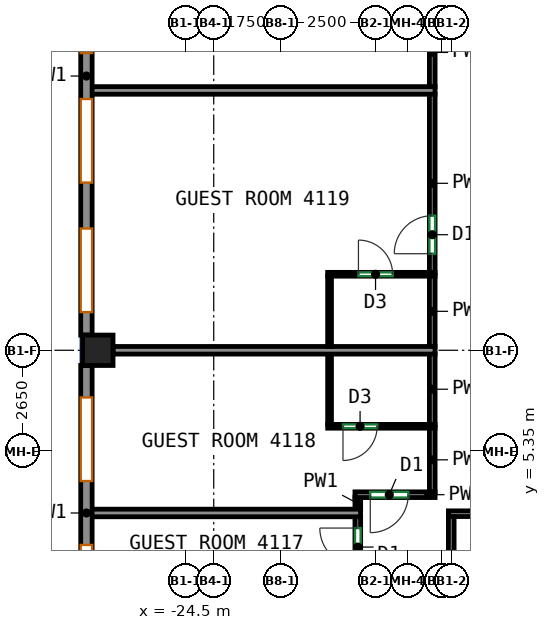
"""IFC4 building model, lengths in metres.
Left out: names, types, materials, properties, quantities, classifications, styles, units other than length and angle.
Written with IfcOpenShell. Run it as: python <this file> out.ifc"""

import sys

from ifc_helpers import new_model, si_unit, direction, frame, frame_2d, origin, origin_2d, place, context, subcontext, project, spatial, rectangle, extrude, source, transform, mapped, element, fill, save


model = new_model("IFC4")
c1 = context("Model", 3, precision=1e-05, world=origin(), true_north=direction((0.0, 1.0)))
c2 = subcontext(c1, "Body", "Model", "MODEL_VIEW")
j1 = project(units=[si_unit("LENGTHUNIT", "METRE"), si_unit("PLANEANGLEUNIT", "RADIAN")], contexts=[c1])
p1 = place(None, origin())
s1 = spatial("IfcSite", under=j1, at=p1, CompositionType="ELEMENT")
p2 = place(p1, origin())
s2 = spatial("IfcBuilding", under=s1, at=p2, CompositionType="ELEMENT")
p3 = place(p2, frame((0.0, 0.0, 175.3)))
s3 = spatial("IfcBuildingStorey", under=s2, at=p3, CompositionType="ELEMENT", Elevation=175.3)
m1 = source(origin(), c2, "Body", "SweptSolid", [
    extrude(rectangle(XDim=0.8, YDim=0.8, at=origin_2d()), origin(), (0.0, 0.0, 1.0), 3.12),
])
p4 = place(p3, frame((-26.8, 8.0, 0.0), z_axis=(0.0, 0.0, 1.0), x_axis=(1.0, 0.0, 0.0)))
e1 = element("IfcColumn", 1, at=p4, inside=s3, PredefinedType="COLUMN", context=c2, shape_type="MappedRepresentation", body=[
    mapped(m1, transform((0.0, 0.0, 0.0))),
])
m2 = source(origin(), c2, "Body", "SweptSolid", [
    extrude(rectangle(XDim=13.632, YDim=0.3, at=frame_2d((6.816, 0.0))), origin(), (0.0, 0.0, 1.0), 3.12),
])
p5 = place(p3, frame((-27.1, 22.032, 0.0), z_axis=(0.0, 0.0, 1.0), x_axis=(0.0, -1.0, 0.0)))
e2 = element("IfcWall", 2, at=p5, inside=s3, PredefinedType="SOLIDWALL", context=c2, shape_type="MappedRepresentation", body=[
    mapped(m2, transform((0.0, 0.0, 0.0))),
])
p6 = place(p5, frame((0.604, 0.0, 0.85)))
e3 = element("IfcOpeningElement", 3, at=p6, cuts=e2, PredefinedType="OPENING", context=c2, shape_type="SweptSolid", body=[
    extrude(rectangle(XDim=2.2, YDim=1.95, at=frame_2d((1.1, 0.975))), frame((0.0, 0.16, 0.0), z_axis=(0.0, -1.0, 0.0), x_axis=(1.0, 0.0, 0.0)), (0.0, 0.0, 1.0), 0.32),
])
p7 = place(p5, frame((4.012, 0.0, 0.85)))
e4 = element("IfcOpeningElement", 4, at=p7, cuts=e2, PredefinedType="OPENING", context=c2, shape_type="SweptSolid", body=[
    extrude(rectangle(XDim=2.2, YDim=1.95, at=frame_2d((1.1, 0.975))), frame((0.0, 0.16, 0.0), z_axis=(0.0, -1.0, 0.0), x_axis=(1.0, 0.0, 0.0)), (0.0, 0.0, 1.0), 0.32),
])
p8 = place(p5, frame((7.42, 0.0, 0.85)))
e5 = element("IfcOpeningElement", 5, at=p8, cuts=e2, PredefinedType="OPENING", context=c2, shape_type="SweptSolid", body=[
    extrude(rectangle(XDim=2.2, YDim=1.95, at=frame_2d((1.1, 0.975))), frame((0.0, 0.16, 0.0), z_axis=(0.0, -1.0, 0.0), x_axis=(1.0, 0.0, 0.0)), (0.0, 0.0, 1.0), 0.32),
])
p9 = place(p5, frame((10.828, 0.0, 0.85)))
e6 = element("IfcOpeningElement", 6, at=p9, cuts=e2, PredefinedType="OPENING", context=c2, shape_type="SweptSolid", body=[
    extrude(rectangle(XDim=2.2, YDim=1.95, at=frame_2d((1.1, 0.975))), frame((0.0, 0.16, 0.0), z_axis=(0.0, -1.0, 0.0), x_axis=(1.0, 0.0, 0.0)), (0.0, 0.0, 1.0), 0.32),
])
m3 = source(origin(), c2, "Body", "SweptSolid", [
    extrude(rectangle(XDim=7.763, YDim=0.3, at=frame_2d((3.881, 0.0))), origin(), (0.0, 0.0, 1.0), 3.12),
])
p10 = place(p3, frame((-27.1, 7.6, 0.0), z_axis=(0.0, 0.0, 1.0), x_axis=(0.0, -1.0, 0.0)))
e7 = element("IfcWall", 7, at=p10, inside=s3, PredefinedType="SOLIDWALL", context=c2, shape_type="MappedRepresentation", body=[
    mapped(m3, transform((0.0, 0.0, 0.0))),
])
p11 = place(p10, frame((0.841, 0.0, 0.85)))
e8 = element("IfcOpeningElement", 8, at=p11, cuts=e7, PredefinedType="OPENING", context=c2, shape_type="SweptSolid", body=[
    extrude(rectangle(XDim=2.2, YDim=1.95, at=frame_2d((1.1, 0.975))), frame((0.0, 0.16, 0.0), z_axis=(0.0, -1.0, 0.0), x_axis=(1.0, 0.0, 0.0)), (0.0, 0.0, 1.0), 0.32),
])
p12 = place(p10, frame((4.722, 0.0, 0.85)))
e9 = element("IfcOpeningElement", 9, at=p12, cuts=e7, PredefinedType="OPENING", context=c2, shape_type="SweptSolid", body=[
    extrude(rectangle(XDim=2.2, YDim=1.95, at=frame_2d((1.1, 0.975))), frame((0.0, 0.16, 0.0), z_axis=(0.0, -1.0, 0.0), x_axis=(1.0, 0.0, 0.0)), (0.0, 0.0, 1.0), 0.32),
])
p13 = place(p3, frame((-19.959, 1.478, 0.0), z_axis=(0.0, 0.0, 1.0), x_axis=(0.0, 1.0, 0.0)))
e10 = element("IfcWall", 10, at=p13, inside=s3, PredefinedType="PARTITIONING", context=c2, shape_type="SweptSolid", body=[
    extrude(rectangle(XDim=2.151, YDim=0.15, at=frame_2d((1.075, 0.0))), origin(), (0.0, 0.0, 1.0), 3.12),
])
p14 = place(p13, frame((0.844, 0.0, 0.0)))
e11 = element("IfcOpeningElement", 11, at=p14, cuts=e10, PredefinedType="OPENING", context=c2, shape_type="SweptSolid", body=[
    extrude(rectangle(XDim=1.0, YDim=2.1, at=frame_2d((0.5, 1.05))), frame((0.0, 0.085, 0.0), z_axis=(0.0, -1.0, 0.0), x_axis=(1.0, 0.0, 0.0)), (0.0, 0.0, 1.0), 0.17),
])
p15 = place(p3, frame((-19.959, 3.809, 0.0), z_axis=(0.0, 0.0, 1.0), x_axis=(0.0, 1.0, 0.0)))
e12 = element("IfcWall", 12, at=p15, inside=s3, PredefinedType="PARTITIONING", context=c2, shape_type="SweptSolid", body=[
    extrude(rectangle(XDim=0.316, YDim=0.15, at=frame_2d((0.158, 0.0))), origin(), (0.0, 0.0, 1.0), 3.12),
])
p16 = place(p3, frame((-17.925, 4.2, 0.0), z_axis=(0.0, 0.0, 1.0), x_axis=(-1.0, 0.0, 0.0)))
e13 = element("IfcWall", 13, at=p16, inside=s3, PredefinedType="PARTITIONING", context=c2, shape_type="SweptSolid", body=[
    extrude(rectangle(XDim=2.109, YDim=0.15, at=frame_2d((1.054, 0.0))), origin(), (0.0, 0.0, 1.0), 3.12),
])
p17 = place(p16, frame((0.706, 0.0, 0.0)))
e14 = element("IfcOpeningElement", 14, at=p17, cuts=e13, PredefinedType="OPENING", context=c2, shape_type="SweptSolid", body=[
    extrude(rectangle(XDim=1.0, YDim=2.1, at=frame_2d((0.5, 1.05))), frame((0.0, 0.085, 0.0), z_axis=(0.0, -1.0, 0.0), x_axis=(1.0, 0.0, 0.0)), (0.0, 0.0, 1.0), 0.17),
])
p18 = place(p3, frame((-18.0, 4.275, 0.0), z_axis=(0.0, 0.0, 1.0), x_axis=(0.0, 1.0, 0.0)))
e15 = element("IfcWall", 15, at=p18, inside=s3, PredefinedType="PARTITIONING", context=c2, shape_type="SweptSolid", body=[
    extrude(rectangle(XDim=1.685, YDim=0.15, at=frame_2d((0.843, 0.0))), origin(), (0.0, 0.0, 1.0), 3.12),
])
p19 = place(p3, frame((-18.0, 6.04, 0.0), z_axis=(0.0, 0.0, 1.0), x_axis=(0.0, 1.0, 0.0)))
e16 = element("IfcWall", 16, at=p19, inside=s3, PredefinedType="PARTITIONING", context=c2, shape_type="SweptSolid", body=[
    extrude(rectangle(XDim=1.87, YDim=0.15, at=frame_2d((0.935, 0.0))), origin(), (0.0, 0.0, 1.0), 3.12),
])
p20 = place(p3, frame((-18.0, 10.04, 0.0), z_axis=(0.0, 0.0, 1.0), x_axis=(0.0, 1.0, 0.0)))
e17 = element("IfcWall", 17, at=p20, inside=s3, PredefinedType="PARTITIONING", context=c2, shape_type="SweptSolid", body=[
    extrude(rectangle(XDim=4.707, YDim=0.15, at=frame_2d((2.354, 0.0))), origin(), (0.0, 0.0, 1.0), 3.12),
])
p21 = place(p20, frame((0.501, 0.0, 0.0)))
e18 = element("IfcOpeningElement", 18, at=p21, cuts=e17, PredefinedType="OPENING", context=c2, shape_type="SweptSolid", body=[
    extrude(rectangle(XDim=1.0, YDim=2.1, at=frame_2d((0.5, 1.05))), frame((0.0, 0.085, 0.0), z_axis=(0.0, -1.0, 0.0), x_axis=(1.0, 0.0, 0.0)), (0.0, 0.0, 1.0), 0.17),
])
p22 = place(p3, frame((-18.0, 8.09, 0.0), z_axis=(0.0, 0.0, 1.0), x_axis=(0.0, 1.0, 0.0)))
e19 = element("IfcWall", 19, at=p22, inside=s3, PredefinedType="PARTITIONING", context=c2, shape_type="SweptSolid", body=[
    extrude(rectangle(XDim=1.87, YDim=0.15, at=frame_2d((0.935, 0.0))), origin(), (0.0, 0.0, 1.0), 3.12),
])
p23 = place(p3, frame((-18.0, 14.927, 0.0), z_axis=(0.0, 0.0, 1.0), x_axis=(0.0, 1.0, 0.0)))
e20 = element("IfcWall", 20, at=p23, inside=s3, PredefinedType="PARTITIONING", context=c2, shape_type="SweptSolid", body=[
    extrude(rectangle(XDim=3.033, YDim=0.15, at=frame_2d((1.517, 0.0))), origin(), (0.0, 0.0, 1.0), 3.12),
])
p24 = place(p23, frame((1.425, 0.0, 0.0)))
e21 = element("IfcOpeningElement", 21, at=p24, cuts=e20, PredefinedType="OPENING", context=c2, shape_type="SweptSolid", body=[
    extrude(rectangle(XDim=1.0, YDim=2.1, at=frame_2d((0.5, 1.05))), frame((0.0, 0.085, 0.0), z_axis=(0.0, -1.0, 0.0), x_axis=(1.0, 0.0, 0.0)), (0.0, 0.0, 1.0), 0.17),
])
p25 = place(p3, frame((-17.575, 3.7, 0.0), z_axis=(0.0, 0.0, 1.0), x_axis=(1.0, 0.0, 0.0)))
e22 = element("IfcWall", 22, at=p25, inside=s3, PredefinedType="PARTITIONING", context=c2, shape_type="SweptSolid", body=[
    extrude(rectangle(XDim=33.85, YDim=0.15, at=frame_2d((16.925, 0.0))), origin(), (0.0, 0.0, 1.0), 3.12),
])
p26 = place(p25, frame((6.596, 0.0, 0.0)))
e23 = element("IfcOpeningElement", 23, at=p26, cuts=e22, PredefinedType="OPENING", context=c2, shape_type="SweptSolid", body=[
    extrude(rectangle(XDim=0.9, YDim=2.1, at=frame_2d((0.45, 1.05))), frame((0.0, 0.085, 0.0), z_axis=(0.0, -1.0, 0.0), x_axis=(1.0, 0.0, 0.0)), (0.0, 0.0, 1.0), 0.17),
])
p27 = place(p25, frame((10.082, 0.0, 0.0)))
e24 = element("IfcOpeningElement", 24, at=p27, cuts=e22, PredefinedType="OPENING", context=c2, shape_type="SweptSolid", body=[
    extrude(rectangle(XDim=0.9, YDim=2.1, at=frame_2d((0.45, 1.05))), frame((0.0, 0.085, 0.0), z_axis=(0.0, -1.0, 0.0), x_axis=(1.0, 0.0, 0.0)), (0.0, 0.0, 1.0), 0.17),
])
p28 = place(p25, frame((21.767, 0.0, 0.0)))
e25 = element("IfcOpeningElement", 25, at=p28, cuts=e22, PredefinedType="OPENING", context=c2, shape_type="SweptSolid", body=[
    extrude(rectangle(XDim=0.9, YDim=2.1, at=frame_2d((0.45, 1.05))), frame((0.0, 0.085, 0.0), z_axis=(0.0, -1.0, 0.0), x_axis=(1.0, 0.0, 0.0)), (0.0, 0.0, 1.0), 0.17),
])
p29 = place(p25, frame((29.649, 0.0, 0.0)))
e26 = element("IfcOpeningElement", 26, at=p29, cuts=e22, PredefinedType="OPENING", context=c2, shape_type="SweptSolid", body=[
    extrude(rectangle(XDim=0.9, YDim=2.1, at=frame_2d((0.45, 1.05))), frame((0.0, 0.085, 0.0), z_axis=(0.0, -1.0, 0.0), x_axis=(1.0, 0.0, 0.0)), (0.0, 0.0, 1.0), 0.17),
])
p30 = place(p3, frame((-17.5, -4.725, 0.0), z_axis=(0.0, 0.0, 1.0), x_axis=(0.0, 1.0, 0.0)))
e27 = element("IfcWall", 27, at=p30, inside=s3, PredefinedType="PARTITIONING", context=c2, shape_type="SweptSolid", body=[
    extrude(rectangle(XDim=8.35, YDim=0.15, at=frame_2d((4.175, 0.0))), origin(), (0.0, 0.0, 1.0), 3.12),
])
p31 = place(p30, frame((0.704, 0.0, 0.0)))
e28 = element("IfcOpeningElement", 28, at=p31, cuts=e27, PredefinedType="OPENING", context=c2, shape_type="SweptSolid", body=[
    extrude(rectangle(XDim=1.0, YDim=2.1, at=frame_2d((0.5, 1.05))), frame((0.0, 0.085, 0.0), z_axis=(0.0, -1.0, 0.0), x_axis=(1.0, 0.0, 0.0)), (0.0, 0.0, 1.0), 0.17),
])
p32 = place(p3, frame((-27.0, 3.719, 0.0), z_axis=(0.0, 0.0, 1.0), x_axis=(1.0, 0.0, 0.0)))
e29 = element("IfcWall", 29, at=p32, inside=s3, PredefinedType="PARTITIONING", context=c2, shape_type="SweptSolid", body=[
    extrude(rectangle(XDim=7.114, YDim=0.2, at=frame_2d((3.557, 0.0))), origin(), (0.0, 0.0, 1.0), 3.12),
])
p33 = place(p3, frame((-17.927, 6.0, 0.0), z_axis=(0.0, 0.0, 1.0), x_axis=(-1.0, 0.0, 0.0)))
e30 = element("IfcWall", 30, at=p33, inside=s3, PredefinedType="PARTITIONING", context=c2, shape_type="SweptSolid", body=[
    extrude(rectangle(XDim=2.825, YDim=0.1, at=frame_2d((1.413, 0.0))), origin(), (0.0, 0.0, 1.0), 3.12),
])
p34 = place(p33, frame((1.522, 0.0, 0.0)))
e31 = element("IfcOpeningElement", 31, at=p34, cuts=e30, PredefinedType="OPENING", context=c2, shape_type="SweptSolid", body=[
    extrude(rectangle(XDim=0.9, YDim=2.1, at=frame_2d((0.45, 1.05))), frame((0.0, 0.06, 0.0), z_axis=(0.0, -1.0, 0.0), x_axis=(1.0, 0.0, 0.0)), (0.0, 0.0, 1.0), 0.12),
])
p35 = place(p3, frame((-20.702, 6.05, 0.0), z_axis=(0.0, 0.0, 1.0), x_axis=(0.0, 1.0, 0.0)))
e32 = element("IfcWall", 32, at=p35, inside=s3, PredefinedType="PARTITIONING", context=c2, shape_type="SweptSolid", body=[
    extrude(rectangle(XDim=1.85, YDim=0.1, at=frame_2d((0.925, 0.0))), origin(), (0.0, 0.0, 1.0), 3.12),
])
p36 = place(p3, frame((-26.4, 8.0, 0.0), z_axis=(0.0, 0.0, 1.0), x_axis=(1.0, 0.0, 0.0)))
e33 = element("IfcWall", 33, at=p36, inside=s3, PredefinedType="PARTITIONING", context=c2, shape_type="SweptSolid", body=[
    extrude(rectangle(XDim=8.473, YDim=0.2, at=frame_2d((4.236, 0.0))), origin(), (0.0, 0.0, 1.0), 3.12),
])
p37 = place(p3, frame((-20.752, 10.0, 0.0), z_axis=(0.0, 0.0, 1.0), x_axis=(1.0, 0.0, 0.0)))
e34 = element("IfcWall", 34, at=p37, inside=s3, PredefinedType="PARTITIONING", context=c2, shape_type="SweptSolid", body=[
    extrude(rectangle(XDim=2.825, YDim=0.1, at=frame_2d((1.413, 0.0))), origin(), (0.0, 0.0, 1.0), 3.12),
])
p38 = place(p37, frame((0.81, 0.0, 0.0)))
e35 = element("IfcOpeningElement", 35, at=p38, cuts=e34, PredefinedType="OPENING", context=c2, shape_type="SweptSolid", body=[
    extrude(rectangle(XDim=0.9, YDim=2.1, at=frame_2d((0.45, 1.05))), frame((0.0, 0.06, 0.0), z_axis=(0.0, -1.0, 0.0), x_axis=(1.0, 0.0, 0.0)), (0.0, 0.0, 1.0), 0.12),
])
p39 = place(p3, frame((-20.702, 8.1, 0.0), z_axis=(0.0, 0.0, 1.0), x_axis=(0.0, 1.0, 0.0)))
e36 = element("IfcWall", 36, at=p39, inside=s3, PredefinedType="PARTITIONING", context=c2, shape_type="SweptSolid", body=[
    extrude(rectangle(XDim=1.85, YDim=0.1, at=frame_2d((0.925, 0.0))), origin(), (0.0, 0.0, 1.0), 3.12),
])
p40 = place(p3, frame((-17.927, 14.837, 0.0), z_axis=(0.0, 0.0, 1.0), x_axis=(-1.0, 0.0, 0.0)))
e37 = element("IfcWall", 37, at=p40, inside=s3, PredefinedType="PARTITIONING", context=c2, shape_type="SweptSolid", body=[
    extrude(rectangle(XDim=9.073, YDim=0.2, at=frame_2d((4.537, 0.0))), origin(), (0.0, 0.0, 1.0), 3.12),
])
p41 = place(p7, origin())
e38 = element("IfcWindow", 38, at=p41, inside=s3, PartitioningType="SINGLE_PANEL", PredefinedType="WINDOW", context=c2, shape_type="SweptSolid", body=[
    extrude(rectangle(XDim=2.2, YDim=1.95, at=frame_2d((1.1, 0.975))), frame((0.0, 0.03, 0.0), z_axis=(0.0, -1.0, 0.0), x_axis=(1.0, 0.0, 0.0)), (0.0, 0.0, 1.0), 0.06),
])
fill(e4, e38)
p42 = place(p8, origin())
e39 = element("IfcWindow", 39, at=p42, inside=s3, PartitioningType="SINGLE_PANEL", PredefinedType="WINDOW", context=c2, shape_type="SweptSolid", body=[
    extrude(rectangle(XDim=2.2, YDim=1.95, at=frame_2d((1.1, 0.975))), frame((0.0, 0.03, 0.0), z_axis=(0.0, -1.0, 0.0), x_axis=(1.0, 0.0, 0.0)), (0.0, 0.0, 1.0), 0.06),
])
fill(e5, e39)
p43 = place(p9, origin())
e40 = element("IfcWindow", 40, at=p43, inside=s3, PartitioningType="SINGLE_PANEL", PredefinedType="WINDOW", context=c2, shape_type="SweptSolid", body=[
    extrude(rectangle(XDim=2.2, YDim=1.95, at=frame_2d((1.1, 0.975))), frame((0.0, 0.03, 0.0), z_axis=(0.0, -1.0, 0.0), x_axis=(1.0, 0.0, 0.0)), (0.0, 0.0, 1.0), 0.06),
])
fill(e6, e40)
p44 = place(p11, origin())
e41 = element("IfcWindow", 41, at=p44, inside=s3, PartitioningType="SINGLE_PANEL", PredefinedType="WINDOW", context=c2, shape_type="SweptSolid", body=[
    extrude(rectangle(XDim=2.2, YDim=1.95, at=frame_2d((1.1, 0.975))), frame((0.0, 0.03, 0.0), z_axis=(0.0, -1.0, 0.0), x_axis=(1.0, 0.0, 0.0)), (0.0, 0.0, 1.0), 0.06),
])
fill(e8, e41)
p45 = place(p12, origin())
e42 = element("IfcWindow", 42, at=p45, inside=s3, PartitioningType="SINGLE_PANEL", PredefinedType="WINDOW", context=c2, shape_type="SweptSolid", body=[
    extrude(rectangle(XDim=2.2, YDim=1.95, at=frame_2d((1.1, 0.975))), frame((0.0, 0.03, 0.0), z_axis=(0.0, -1.0, 0.0), x_axis=(1.0, 0.0, 0.0)), (0.0, 0.0, 1.0), 0.06),
])
fill(e9, e42)
p46 = place(p14, origin())
e43 = element("IfcDoor", 43, at=p46, inside=s3, OperationType="SINGLE_SWING_RIGHT", PredefinedType="DOOR", context=c2, shape_type="SweptSolid", body=[
    extrude(rectangle(XDim=1.0, YDim=2.1, at=frame_2d((0.5, 1.05))), frame((0.0, 0.025, 0.0), z_axis=(0.0, -1.0, 0.0), x_axis=(1.0, 0.0, 0.0)), (0.0, 0.0, 1.0), 0.05),
])
fill(e11, e43)
p47 = place(p17, origin())
e44 = element("IfcDoor", 44, at=p47, inside=s3, OperationType="SINGLE_SWING_RIGHT", PredefinedType="DOOR", context=c2, shape_type="SweptSolid", body=[
    extrude(rectangle(XDim=1.0, YDim=2.1, at=frame_2d((0.5, 1.05))), frame((0.0, 0.025, 0.0), z_axis=(0.0, -1.0, 0.0), x_axis=(1.0, 0.0, 0.0)), (0.0, 0.0, 1.0), 0.05),
])
fill(e14, e44)
p48 = place(p34, origin())
e45 = element("IfcDoor", 45, at=p48, inside=s3, OperationType="SINGLE_SWING_RIGHT", PredefinedType="DOOR", context=c2, shape_type="SweptSolid", body=[
    extrude(rectangle(XDim=0.9, YDim=2.1, at=frame_2d((0.45, 1.05))), frame((0.0, 0.025, 0.0), z_axis=(0.0, -1.0, 0.0), x_axis=(1.0, 0.0, 0.0)), (0.0, 0.0, 1.0), 0.05),
])
fill(e31, e45)
p49 = place(p38, origin())
e46 = element("IfcDoor", 46, at=p49, inside=s3, OperationType="SINGLE_SWING_LEFT", PredefinedType="DOOR", context=c2, shape_type="SweptSolid", body=[
    extrude(rectangle(XDim=0.9, YDim=2.1, at=frame_2d((0.45, 1.05))), frame((0.0, 0.025, 0.0), z_axis=(0.0, -1.0, 0.0), x_axis=(1.0, 0.0, 0.0)), (0.0, 0.0, 1.0), 0.05),
])
fill(e35, e46)
p50 = place(p21, origin())
e47 = element("IfcDoor", 47, at=p50, inside=s3, OperationType="SINGLE_SWING_LEFT", PredefinedType="DOOR", context=c2, shape_type="SweptSolid", body=[
    extrude(rectangle(XDim=1.0, YDim=2.1, at=frame_2d((0.5, 1.05))), frame((0.0, 0.025, 0.0), z_axis=(0.0, -1.0, 0.0), x_axis=(1.0, 0.0, 0.0)), (0.0, 0.0, 1.0), 0.05),
])
fill(e18, e47)
save(model, sys.argv[1])
